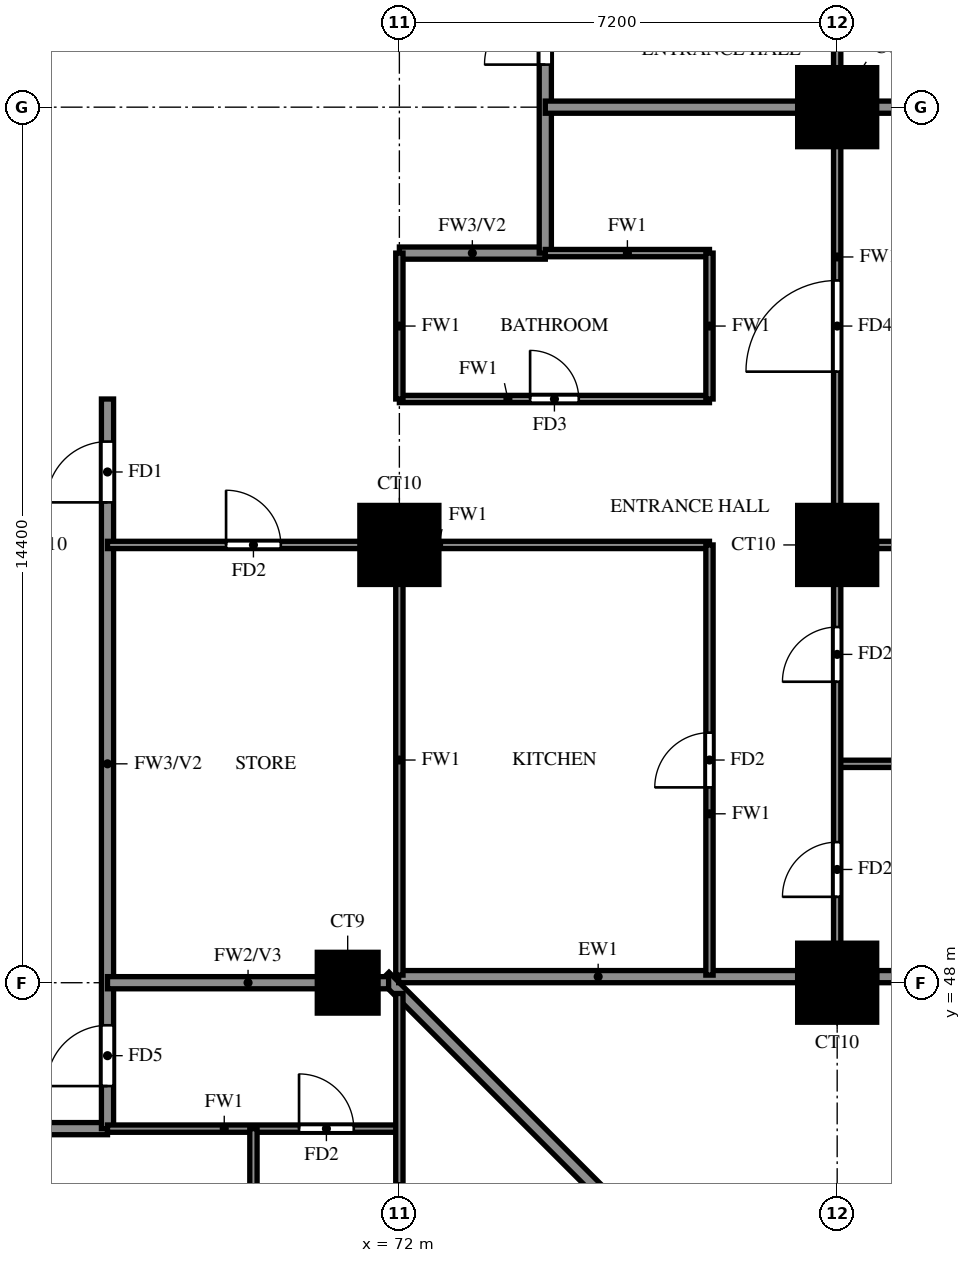
"""IFC4 building model, lengths in metres.
Left out: names, types, materials, properties, quantities, classifications, styles, units other than length and angle.
Written with IfcOpenShell. Run it as: python <this file> out.ifc"""

import sys

from ifc_helpers import new_model, si_unit, direction, frame, frame_2d, origin, origin_2d, place, context, subcontext, project, spatial, rectangle, extrude, source, transform, mapped, element, fill, save


model = new_model("IFC4")
c1 = context("Model", 3, precision=1e-05, world=origin(), true_north=direction((0.0, 1.0)))
c2 = subcontext(c1, "Body", "Model", "MODEL_VIEW")
j1 = project(units=[si_unit("LENGTHUNIT", "METRE"), si_unit("PLANEANGLEUNIT", "RADIAN")], contexts=[c1])
p1 = place(None, origin())
s1 = spatial("IfcSite", under=j1, at=p1, CompositionType="ELEMENT")
p2 = place(p1, origin())
s2 = spatial("IfcBuilding", under=s1, at=p2, CompositionType="ELEMENT")
p3 = place(p2, frame((0.0, 0.0, 69.0)))
s3 = spatial("IfcBuildingStorey", under=s2, at=p3, CompositionType="ELEMENT", Elevation=69.0)
m1 = source(origin(), c2, "Body", "SweptSolid", [
    extrude(rectangle(XDim=1.0, YDim=1.0, at=origin_2d()), origin(), (0.0, 0.0, 1.0), 3.18),
])
p4 = place(p3, frame((71.15, 48.0, 0.0), z_axis=(0.0, 0.0, 1.0), x_axis=(1.0, 0.0, 0.0)))
e1 = element("IfcColumn", 1, at=p4, inside=s3, PredefinedType="COLUMN", context=c2, shape_type="MappedRepresentation", body=[
    mapped(m1, transform((0.0, 0.0, 0.0))),
])
m2 = source(origin(), c2, "Body", "SweptSolid", [
    extrude(rectangle(XDim=1.3, YDim=1.3, at=origin_2d()), origin(), (0.0, 0.0, 1.0), 3.18),
])
for number, where, z_axis, x_axis in (
    (2, (79.2, 48.0, 0.0), (0.0, 0.0, 1.0), (1.0, 0.0, 0.0)),
    (3, (72.0, 55.2, 0.0), (0.0, 0.0, 1.0), (1.0, 0.0, 0.0)),
    (4, (79.2, 55.2, 0.0), (0.0, 0.0, 1.0), (1.0, 0.0, 0.0)),
    (5, (79.2, 62.4, 0.0), (0.0, 0.0, 1.0), (1.0, 0.0, 0.0)),
):
    element("IfcColumn", number, at=place(p3, frame(where, z_axis=z_axis, x_axis=x_axis)), inside=s3, PredefinedType="COLUMN", context=c2, shape_type="MappedRepresentation", body=[
        mapped(m2, transform((0.0, 0.0, 0.0))),
    ])
p5 = place(p3, frame((85.996, 33.863, 0.0), z_axis=(0.0, 0.0, 1.0), x_axis=(-0.707100718496, 0.707112843825, 0.0)))
e6 = element("IfcWall", 6, at=p5, inside=s3, PredefinedType="SOLIDWALL", context=c2, shape_type="SweptSolid", body=[
    extrude(rectangle(XDim=20.135, YDim=0.2, at=frame_2d((10.067, 0.0))), origin(), (0.0, 0.0, 1.0), 3.18),
])
p6 = place(p3, frame((71.989, 48.1, 0.0), z_axis=(0.0, 0.0, 1.0), x_axis=(1.0, 0.0, 0.0)))
e7 = element("IfcWall", 7, at=p6, inside=s3, PredefinedType="SOLIDWALL", context=c2, shape_type="SweptSolid", body=[
    extrude(rectangle(XDim=6.562, YDim=0.2, at=frame_2d((3.281, 0.0))), origin(), (0.0, 0.0, 1.0), 3.18),
])
p7 = place(p3, frame((79.85, 48.1, 0.0), z_axis=(0.0, 0.0, 1.0), x_axis=(1.0, 0.0, 0.0)))
e8 = element("IfcWall", 8, at=p7, inside=s3, PredefinedType="SOLIDWALL", context=c2, shape_type="SweptSolid", body=[
    extrude(rectangle(XDim=5.45, YDim=0.2, at=frame_2d((2.725, 0.0))), origin(), (0.0, 0.0, 1.0), 3.18),
])
p8 = place(p7, frame((1.525, 0.0, 0.6)))
e9 = element("IfcOpeningElement", 9, at=p8, cuts=e8, PredefinedType="OPENING", context=c2, shape_type="SweptSolid", body=[
    extrude(rectangle(XDim=2.4, YDim=2.4, at=frame_2d((1.2, 1.2))), frame((0.0, 0.11, 0.0), z_axis=(0.0, -1.0, 0.0), x_axis=(1.0, 0.0, 0.0)), (0.0, 0.0, 1.0), 0.22),
])
p9 = place(p3, frame((60.0, 45.6, 0.0), z_axis=(0.0, 0.0, 1.0), x_axis=(1.0, 0.0, 0.0)))
e10 = element("IfcWall", 10, at=p9, inside=s3, PredefinedType="SOLIDWALL", context=c2, shape_type="SweptSolid", body=[
    extrude(rectangle(XDim=7.2, YDim=0.2, at=frame_2d((3.6, 0.0))), origin(), (0.0, 0.0, 1.0), 3.18),
])
p10 = place(p3, frame((72.0, 60.0, 0.0), z_axis=(0.0, 0.0, 1.0), x_axis=(1.0, 0.0, 0.0)))
e11 = element("IfcWall", 11, at=p10, inside=s3, PredefinedType="SOLIDWALL", context=c2, shape_type="SweptSolid", body=[
    extrude(rectangle(XDim=2.4, YDim=0.2, at=frame_2d((1.2, 0.0))), origin(), (0.0, 0.0, 1.0), 3.18),
])
p11 = place(p3, frame((67.2, 45.6, 0.0), z_axis=(0.0, 0.0, 1.0), x_axis=(0.0, 1.0, 0.0)))
e12 = element("IfcWall", 12, at=p11, inside=s3, PredefinedType="SOLIDWALL", context=c2, shape_type="SweptSolid", body=[
    extrude(rectangle(XDim=12.0, YDim=0.2, at=frame_2d((6.0, 0.0))), origin(), (0.0, 0.0, 1.0), 3.18),
])
p12 = place(p11, frame((10.3, 0.0, 0.0)))
e13 = element("IfcOpeningElement", 13, at=p12, cuts=e12, PredefinedType="OPENING", context=c2, shape_type="SweptSolid", body=[
    extrude(rectangle(XDim=1.0, YDim=2.1, at=frame_2d((0.5, 1.05))), frame((0.0, 0.11, 0.0), z_axis=(0.0, -1.0, 0.0), x_axis=(1.0, 0.0, 0.0)), (0.0, 0.0, 1.0), 0.22),
])
p13 = place(p11, frame((0.7, 0.0, 0.0)))
e14 = element("IfcOpeningElement", 14, at=p13, cuts=e12, PredefinedType="OPENING", context=c2, shape_type="SweptSolid", body=[
    extrude(rectangle(XDim=1.0, YDim=2.1, at=frame_2d((0.5, 1.05))), frame((0.0, 0.11, 0.0), z_axis=(0.0, -1.0, 0.0), x_axis=(1.0, 0.0, 0.0)), (0.0, 0.0, 1.0), 0.22),
])
p14 = place(p3, frame((74.4, 60.0, 0.0), z_axis=(0.0, 0.0, 1.0), x_axis=(0.0, 1.0, 0.0)))
e15 = element("IfcWall", 15, at=p14, inside=s3, PredefinedType="SOLIDWALL", context=c2, shape_type="SweptSolid", body=[
    extrude(rectangle(XDim=9.6, YDim=0.2, at=frame_2d((4.8, 0.0))), origin(), (0.0, 0.0, 1.0), 3.18),
])
p15 = place(p14, frame((3.1, 0.0, 0.0)))
e16 = element("IfcOpeningElement", 16, at=p15, cuts=e15, PredefinedType="OPENING", context=c2, shape_type="SweptSolid", body=[
    extrude(rectangle(XDim=1.0, YDim=2.1, at=frame_2d((0.5, 1.05))), frame((0.0, 0.11, 0.0), z_axis=(0.0, -1.0, 0.0), x_axis=(1.0, 0.0, 0.0)), (0.0, 0.0, 1.0), 0.22),
])
p16 = place(p3, frame((67.2, 48.0, 0.0), z_axis=(0.0, 0.0, 1.0), x_axis=(1.0, 0.0, 0.0)))
e17 = element("IfcWall", 17, at=p16, inside=s3, PredefinedType="SOLIDWALL", context=c2, shape_type="SweptSolid", body=[
    extrude(rectangle(XDim=4.623, YDim=0.2, at=frame_2d((2.312, 0.0))), origin(), (0.0, 0.0, 1.0), 3.18),
])
p17 = place(p3, frame((74.4, 62.4, 0.0), z_axis=(0.0, 0.0, 1.0), x_axis=(1.0, 0.0, 0.0)))
e18 = element("IfcWall", 18, at=p17, inside=s3, PredefinedType="SOLIDWALL", context=c2, shape_type="SweptSolid", body=[
    extrude(rectangle(XDim=11.875, YDim=0.2, at=frame_2d((5.938, 0.0))), origin(), (0.0, 0.0, 1.0), 3.18),
])
p18 = place(p3, frame((67.2, 45.6, 0.0), z_axis=(0.0, 0.0, 1.0), x_axis=(1.0, 0.0, 0.0)))
e19 = element("IfcWall", 19, at=p18, inside=s3, PredefinedType="PARTITIONING", context=c2, shape_type="SweptSolid", body=[
    extrude(rectangle(XDim=4.8, YDim=0.12, at=frame_2d((2.4, 0.0))), origin(), (0.0, 0.0, 1.0), 3.18),
])
p19 = place(p18, frame((3.15, 0.0, 0.0)))
e20 = element("IfcOpeningElement", 20, at=p19, cuts=e19, PredefinedType="OPENING", context=c2, shape_type="SweptSolid", body=[
    extrude(rectangle(XDim=0.9, YDim=2.1, at=frame_2d((0.45, 1.05))), frame((0.0, 0.07, 0.0), z_axis=(0.0, -1.0, 0.0), x_axis=(1.0, 0.0, 0.0)), (0.0, 0.0, 1.0), 0.14),
])
p20 = place(p3, frame((79.2, 51.6, 0.0), z_axis=(0.0, 0.0, 1.0), x_axis=(1.0, 0.0, 0.0)))
e21 = element("IfcWall", 21, at=p20, inside=s3, PredefinedType="PARTITIONING", context=c2, shape_type="SweptSolid", body=[
    extrude(rectangle(XDim=7.075, YDim=0.12, at=frame_2d((3.538, 0.0))), origin(), (0.0, 0.0, 1.0), 2.28),
])
p21 = place(p3, frame((67.2, 55.2, 0.0), z_axis=(0.0, 0.0, 1.0), x_axis=(1.0, 0.0, 0.0)))
e22 = element("IfcWall", 22, at=p21, inside=s3, PredefinedType="PARTITIONING", context=c2, shape_type="SweptSolid", body=[
    extrude(rectangle(XDim=9.9, YDim=0.12, at=frame_2d((4.95, 0.0))), origin(), (0.0, 0.0, 1.0), 3.18),
])
p22 = place(p21, frame((1.95, 0.0, 0.0)))
e23 = element("IfcOpeningElement", 23, at=p22, cuts=e22, PredefinedType="OPENING", context=c2, shape_type="SweptSolid", body=[
    extrude(rectangle(XDim=0.9, YDim=2.1, at=frame_2d((0.45, 1.05))), frame((0.0, 0.07, 0.0), z_axis=(0.0, -1.0, 0.0), x_axis=(1.0, 0.0, 0.0)), (0.0, 0.0, 1.0), 0.14),
])
p23 = place(p3, frame((79.2, 55.2, 0.0), z_axis=(0.0, 0.0, 1.0), x_axis=(1.0, 0.0, 0.0)))
e24 = element("IfcWall", 24, at=p23, inside=s3, PredefinedType="PARTITIONING", context=c2, shape_type="SweptSolid", body=[
    extrude(rectangle(XDim=7.075, YDim=0.12, at=frame_2d((3.538, 0.0))), origin(), (0.0, 0.0, 1.0), 3.18),
])
p24 = place(p3, frame((72.0, 57.6, 0.0), z_axis=(0.0, 0.0, 1.0), x_axis=(1.0, 0.0, 0.0)))
e25 = element("IfcWall", 25, at=p24, inside=s3, PredefinedType="PARTITIONING", context=c2, shape_type="SweptSolid", body=[
    extrude(rectangle(XDim=5.1, YDim=0.12, at=frame_2d((2.55, 0.0))), origin(), (0.0, 0.0, 1.0), 3.18),
])
p25 = place(p24, frame((2.15, 0.0, 0.0)))
e26 = element("IfcOpeningElement", 26, at=p25, cuts=e25, PredefinedType="OPENING", context=c2, shape_type="SweptSolid", body=[
    extrude(rectangle(XDim=0.8, YDim=2.1, at=frame_2d((0.4, 1.05))), frame((0.0, 0.07, 0.0), z_axis=(0.0, -1.0, 0.0), x_axis=(1.0, 0.0, 0.0)), (0.0, 0.0, 1.0), 0.14),
])
for number, where, z_axis, x_axis in (
    (27, (74.4, 60.0, 0.0), (0.0, 0.0, 1.0), (1.0, 0.0, 0.0)),
    (28, (69.6, 42.9, 0.0), (0.0, 0.0, 1.0), (0.0, 1.0, 0.0)),
):
    element("IfcWall", number, at=place(p3, frame(where, z_axis=z_axis, x_axis=x_axis)), inside=s3, PredefinedType="PARTITIONING", context=c2, shape_type="SweptSolid", body=[
        extrude(rectangle(XDim=2.7, YDim=0.12, at=frame_2d((1.35, 0.0))), origin(), (0.0, 0.0, 1.0), 3.18),
    ])
p26 = place(p3, frame((72.0, 33.725, 0.0), z_axis=(0.0, 0.0, 1.0), x_axis=(0.0, 1.0, 0.0)))
e29 = element("IfcWall", 29, at=p26, inside=s3, PredefinedType="PARTITIONING", context=c2, shape_type="SweptSolid", body=[
    extrude(rectangle(XDim=14.098, YDim=0.12, at=frame_2d((7.049, 0.0))), origin(), (0.0, 0.0, 1.0), 2.28),
])
p27 = place(p26, frame((10.075, 0.0, 0.0)))
e30 = element("IfcOpeningElement", 30, at=p27, cuts=e29, PredefinedType="OPENING", context=c2, shape_type="SweptSolid", body=[
    extrude(rectangle(XDim=0.9, YDim=2.1, at=frame_2d((0.45, 1.05))), frame((0.0, 0.07, 0.0), z_axis=(0.0, -1.0, 0.0), x_axis=(1.0, 0.0, 0.0)), (0.0, 0.0, 1.0), 0.14),
])
p28 = place(p3, frame((72.0, 48.125, 0.0), z_axis=(0.0, 0.0, 1.0), x_axis=(0.0, 1.0, 0.0)))
e31 = element("IfcWall", 31, at=p28, inside=s3, PredefinedType="PARTITIONING", context=c2, shape_type="SweptSolid", body=[
    extrude(rectangle(XDim=7.075, YDim=0.12, at=frame_2d((3.538, 0.0))), origin(), (0.0, 0.0, 1.0), 3.18),
])
p29 = place(p3, frame((72.0, 57.6, 0.0), z_axis=(0.0, 0.0, 1.0), x_axis=(0.0, 1.0, 0.0)))
e32 = element("IfcWall", 32, at=p29, inside=s3, PredefinedType="PARTITIONING", context=c2, shape_type="SweptSolid", body=[
    extrude(rectangle(XDim=2.4, YDim=0.12, at=frame_2d((1.2, 0.0))), origin(), (0.0, 0.0, 1.0), 3.18),
])
p30 = place(p3, frame((77.1, 48.125, 0.0), z_axis=(0.0, 0.0, 1.0), x_axis=(0.0, 1.0, 0.0)))
e33 = element("IfcWall", 33, at=p30, inside=s3, PredefinedType="PARTITIONING", context=c2, shape_type="SweptSolid", body=[
    extrude(rectangle(XDim=7.075, YDim=0.12, at=frame_2d((3.538, 0.0))), origin(), (0.0, 0.0, 1.0), 3.18),
])
p31 = place(p30, frame((3.087, 0.0, 0.0)))
e34 = element("IfcOpeningElement", 34, at=p31, cuts=e33, PredefinedType="OPENING", context=c2, shape_type="SweptSolid", body=[
    extrude(rectangle(XDim=0.9, YDim=2.1, at=frame_2d((0.45, 1.05))), frame((0.0, 0.07, 0.0), z_axis=(0.0, -1.0, 0.0), x_axis=(1.0, 0.0, 0.0)), (0.0, 0.0, 1.0), 0.14),
])
p32 = place(p3, frame((77.1, 57.6, 0.0), z_axis=(0.0, 0.0, 1.0), x_axis=(0.0, 1.0, 0.0)))
e35 = element("IfcWall", 35, at=p32, inside=s3, PredefinedType="PARTITIONING", context=c2, shape_type="SweptSolid", body=[
    extrude(rectangle(XDim=2.4, YDim=0.12, at=frame_2d((1.2, 0.0))), origin(), (0.0, 0.0, 1.0), 3.18),
])
p33 = place(p3, frame((79.2, 48.125, 0.0), z_axis=(0.0, 0.0, 1.0), x_axis=(0.0, 1.0, 0.0)))
e36 = element("IfcWall", 36, at=p33, inside=s3, PredefinedType="PARTITIONING", context=c2, shape_type="SweptSolid", body=[
    extrude(rectangle(XDim=21.475, YDim=0.12, at=frame_2d((10.738, 0.0))), origin(), (0.0, 0.0, 1.0), 3.18),
])
p34 = place(p33, frame((1.288, 0.0, 0.0)))
e37 = element("IfcOpeningElement", 37, at=p34, cuts=e36, PredefinedType="OPENING", context=c2, shape_type="SweptSolid", body=[
    extrude(rectangle(XDim=0.9, YDim=2.1, at=frame_2d((0.45, 1.05))), frame((0.0, 0.07, 0.0), z_axis=(0.0, -1.0, 0.0), x_axis=(1.0, 0.0, 0.0)), (0.0, 0.0, 1.0), 0.14),
])
p35 = place(p33, frame((4.825, 0.0, 0.0)))
e38 = element("IfcOpeningElement", 38, at=p35, cuts=e36, PredefinedType="OPENING", context=c2, shape_type="SweptSolid", body=[
    extrude(rectangle(XDim=0.9, YDim=2.1, at=frame_2d((0.45, 1.05))), frame((0.0, 0.07, 0.0), z_axis=(0.0, -1.0, 0.0), x_axis=(1.0, 0.0, 0.0)), (0.0, 0.0, 1.0), 0.14),
])
p36 = place(p33, frame((9.925, 0.0, 0.0)))
e39 = element("IfcOpeningElement", 39, at=p36, cuts=e36, PredefinedType="OPENING", context=c2, shape_type="SweptSolid", body=[
    extrude(rectangle(XDim=1.5, YDim=2.1, at=frame_2d((0.75, 1.05))), frame((0.0, 0.07, 0.0), z_axis=(0.0, -1.0, 0.0), x_axis=(1.0, 0.0, 0.0)), (0.0, 0.0, 1.0), 0.14),
])
p37 = place(p33, frame((15.625, 0.0, 0.0)))
e40 = element("IfcOpeningElement", 40, at=p37, cuts=e36, PredefinedType="OPENING", context=c2, shape_type="SweptSolid", body=[
    extrude(rectangle(XDim=0.9, YDim=2.1, at=frame_2d((0.45, 1.05))), frame((0.0, 0.07, 0.0), z_axis=(0.0, -1.0, 0.0), x_axis=(1.0, 0.0, 0.0)), (0.0, 0.0, 1.0), 0.14),
])
p38 = place(p33, frame((19.225, 0.0, 0.0)))
e41 = element("IfcOpeningElement", 41, at=p38, cuts=e36, PredefinedType="OPENING", context=c2, shape_type="SweptSolid", body=[
    extrude(rectangle(XDim=0.9, YDim=2.1, at=frame_2d((0.45, 1.05))), frame((0.0, 0.07, 0.0), z_axis=(0.0, -1.0, 0.0), x_axis=(1.0, 0.0, 0.0)), (0.0, 0.0, 1.0), 0.14),
])
p39 = place(p12, origin())
e42 = element("IfcDoor", 42, at=p39, inside=s3, OperationType="SINGLE_SWING_RIGHT", PredefinedType="DOOR", context=c2, shape_type="SweptSolid", body=[
    extrude(rectangle(XDim=1.0, YDim=2.1, at=frame_2d((0.5, 1.05))), frame((0.0, 0.025, 0.0), z_axis=(0.0, -1.0, 0.0), x_axis=(1.0, 0.0, 0.0)), (0.0, 0.0, 1.0), 0.05),
])
fill(e13, e42)
p40 = place(p34, origin())
e43 = element("IfcDoor", 43, at=p40, inside=s3, OperationType="SINGLE_SWING_LEFT", PredefinedType="DOOR", context=c2, shape_type="SweptSolid", body=[
    extrude(rectangle(XDim=0.9, YDim=2.1, at=frame_2d((0.45, 1.05))), frame((0.0, 0.025, 0.0), z_axis=(0.0, -1.0, 0.0), x_axis=(1.0, 0.0, 0.0)), (0.0, 0.0, 1.0), 0.05),
])
fill(e37, e43)
p41 = place(p35, origin())
e44 = element("IfcDoor", 44, at=p41, inside=s3, OperationType="SINGLE_SWING_LEFT", PredefinedType="DOOR", context=c2, shape_type="SweptSolid", body=[
    extrude(rectangle(XDim=0.9, YDim=2.1, at=frame_2d((0.45, 1.05))), frame((0.0, 0.025, 0.0), z_axis=(0.0, -1.0, 0.0), x_axis=(1.0, 0.0, 0.0)), (0.0, 0.0, 1.0), 0.05),
])
fill(e38, e44)
p42 = place(p36, origin())
e45 = element("IfcDoor", 45, at=p42, inside=s3, OperationType="SINGLE_SWING_RIGHT", PredefinedType="DOOR", context=c2, shape_type="SweptSolid", body=[
    extrude(rectangle(XDim=1.5, YDim=2.1, at=frame_2d((0.75, 1.05))), frame((0.0, 0.025, 0.0), z_axis=(0.0, -1.0, 0.0), x_axis=(1.0, 0.0, 0.0)), (0.0, 0.0, 1.0), 0.05),
])
fill(e39, e45)
p43 = place(p31, origin())
e46 = element("IfcDoor", 46, at=p43, inside=s3, OperationType="SINGLE_SWING_LEFT", PredefinedType="DOOR", context=c2, shape_type="SweptSolid", body=[
    extrude(rectangle(XDim=0.9, YDim=2.1, at=frame_2d((0.45, 1.05))), frame((0.0, 0.025, 0.0), z_axis=(0.0, -1.0, 0.0), x_axis=(1.0, 0.0, 0.0)), (0.0, 0.0, 1.0), 0.05),
])
fill(e34, e46)
p44 = place(p25, origin())
e47 = element("IfcDoor", 47, at=p44, inside=s3, OperationType="SINGLE_SWING_LEFT", PredefinedType="DOOR", context=c2, shape_type="SweptSolid", body=[
    extrude(rectangle(XDim=0.8, YDim=2.1, at=frame_2d((0.4, 1.05))), frame((0.0, 0.025, 0.0), z_axis=(0.0, -1.0, 0.0), x_axis=(1.0, 0.0, 0.0)), (0.0, 0.0, 1.0), 0.05),
])
fill(e26, e47)
p45 = place(p22, origin())
e48 = element("IfcDoor", 48, at=p45, inside=s3, OperationType="SINGLE_SWING_RIGHT", PredefinedType="DOOR", context=c2, shape_type="SweptSolid", body=[
    extrude(rectangle(XDim=0.9, YDim=2.1, at=frame_2d((0.45, 1.05))), frame((0.0, 0.025, 0.0), z_axis=(0.0, -1.0, 0.0), x_axis=(1.0, 0.0, 0.0)), (0.0, 0.0, 1.0), 0.05),
])
fill(e23, e48)
p46 = place(p15, origin())
e49 = element("IfcDoor", 49, at=p46, inside=s3, OperationType="SINGLE_SWING_LEFT", PredefinedType="DOOR", context=c2, shape_type="SweptSolid", body=[
    extrude(rectangle(XDim=1.0, YDim=2.1, at=frame_2d((0.5, 1.05))), frame((0.0, 0.025, 0.0), z_axis=(0.0, -1.0, 0.0), x_axis=(1.0, 0.0, 0.0)), (0.0, 0.0, 1.0), 0.05),
])
fill(e16, e49)
p47 = place(p19, origin())
e50 = element("IfcDoor", 50, at=p47, inside=s3, OperationType="SINGLE_SWING_RIGHT", PredefinedType="DOOR", context=c2, shape_type="SweptSolid", body=[
    extrude(rectangle(XDim=0.9, YDim=2.1, at=frame_2d((0.45, 1.05))), frame((0.0, 0.025, 0.0), z_axis=(0.0, -1.0, 0.0), x_axis=(1.0, 0.0, 0.0)), (0.0, 0.0, 1.0), 0.05),
])
fill(e20, e50)
p48 = place(p13, origin())
e51 = element("IfcDoor", 51, at=p48, inside=s3, OperationType="SINGLE_SWING_LEFT", PredefinedType="DOOR", context=c2, shape_type="SweptSolid", body=[
    extrude(rectangle(XDim=1.0, YDim=2.1, at=frame_2d((0.5, 1.05))), frame((0.0, 0.025, 0.0), z_axis=(0.0, -1.0, 0.0), x_axis=(1.0, 0.0, 0.0)), (0.0, 0.0, 1.0), 0.05),
])
fill(e14, e51)
save(model, sys.argv[1])
